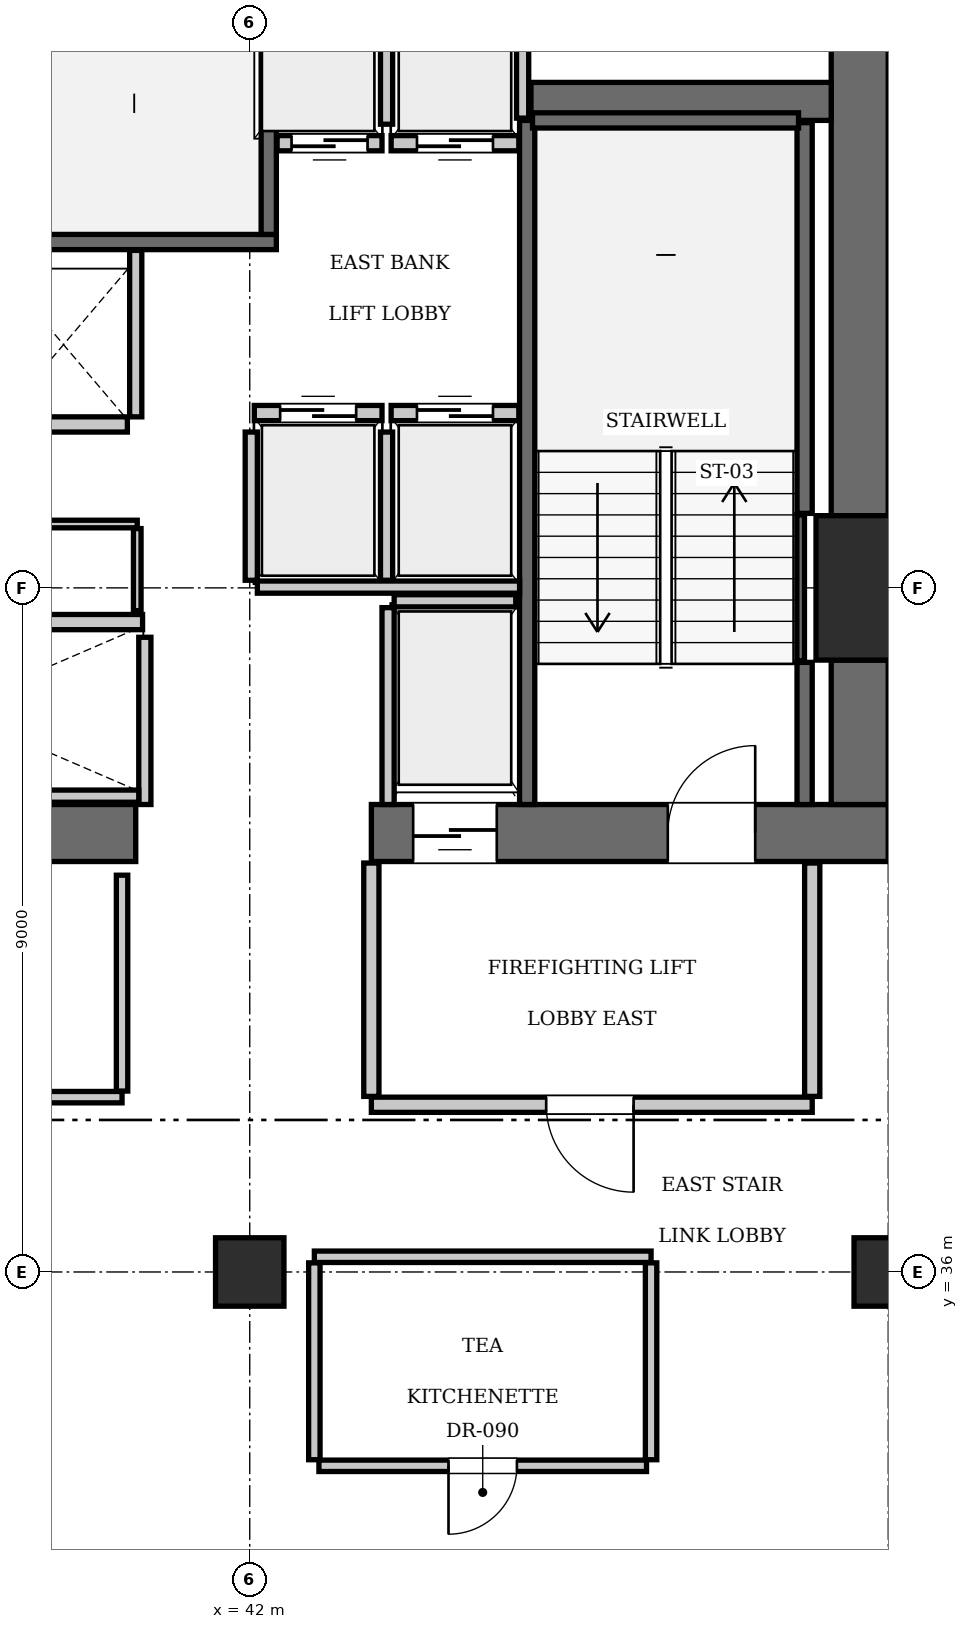
"""IFC4 building model, lengths in metres.
Left out: names, types, materials, properties, quantities, classifications, styles, units other than length and angle.
Written with IfcOpenShell. Run it as: python <this file> out.ifc"""

import sys

from ifc_helpers import new_model, si_unit, direction, frame, frame_2d, origin, origin_2d, place, context, subcontext, project, spatial, rectangle, extrude, element, fill, save


model = new_model("IFC4")
c1 = context("Model", 3, precision=1e-05, world=origin(), true_north=direction((0.0, 1.0)))
c2 = subcontext(c1, "Body", "Model", "MODEL_VIEW")
j1 = project(units=[si_unit("LENGTHUNIT", "METRE"), si_unit("PLANEANGLEUNIT", "RADIAN")], contexts=[c1])
p1 = place(None, origin())
s1 = spatial("IfcSite", under=j1, at=p1, CompositionType="ELEMENT")
p2 = place(p1, origin())
s2 = spatial("IfcBuilding", under=s1, at=p2, CompositionType="ELEMENT")
p3 = place(p2, frame((0.0, 0.0, 150.5)))
s3 = spatial("IfcBuildingStorey", under=s2, at=p3, CompositionType="ELEMENT", Elevation=150.5)
p4 = place(p3, frame((50.4, 45.0, 0.0), z_axis=(0.0, 0.0, 1.0), x_axis=(1.0, 0.0, 0.0)))
e1 = element("IfcColumn", 1, at=p4, inside=s3, PredefinedType="COLUMN", context=c2, shape_type="SweptSolid", body=[
    extrude(rectangle(XDim=1.9, YDim=1.9, at=origin_2d()), origin(), (0.0, 0.0, 1.0), 3.85),
])
p5 = place(p3, frame((35.1, 41.775, 0.0), z_axis=(0.0, 0.0, 1.0), x_axis=(1.0, 0.0, 0.0)))
e2 = element("IfcWall", 2, at=p5, inside=s3, PredefinedType="SHEAR", context=c2, shape_type="SweptSolid", body=[
    extrude(rectangle(XDim=5.4, YDim=0.75, at=frame_2d((2.7, 0.0))), origin(), (0.0, 0.0, 1.0), 3.85),
])
p6 = place(p3, frame((43.6, 41.775, 0.0), z_axis=(0.0, 0.0, 1.0), x_axis=(1.0, 0.0, 0.0)))
e3 = element("IfcWall", 3, at=p6, inside=s3, PredefinedType="SHEAR", context=c2, shape_type="SweptSolid", body=[
    extrude(rectangle(XDim=6.8, YDim=0.75, at=frame_2d((3.4, 0.0))), origin(), (0.0, 0.0, 1.0), 3.85),
])
p7 = place(p6, frame((3.9, 0.0, 0.0)))
e4 = element("IfcOpeningElement", 4, at=p7, cuts=e3, PredefinedType="OPENING", context=c2, shape_type="SweptSolid", body=[
    extrude(rectangle(XDim=1.15, YDim=2.15, at=frame_2d((0.575, 1.075))), frame((0.0, 0.385, 0.0), z_axis=(0.0, -1.0, 0.0), x_axis=(1.0, 0.0, 0.0)), (0.0, 0.0, 1.0), 0.77),
])
p8 = place(p6, frame((0.55, 0.0, 0.0)))
e5 = element("IfcOpeningElement", 5, at=p8, cuts=e3, PredefinedType="OPENING", context=c2, shape_type="SweptSolid", body=[
    extrude(rectangle(XDim=1.1, YDim=2.2, at=frame_2d((0.55, 1.1))), frame((0.0, 0.385, 0.0), z_axis=(0.0, -1.0, 0.0), x_axis=(1.0, 0.0, 0.0)), (0.0, 0.0, 1.0), 0.77),
])
p9 = place(p3, frame((50.025, 42.15, 0.0), z_axis=(0.0, 0.0, 1.0), x_axis=(0.0, 1.0, 0.0)))
e6 = element("IfcWall", 6, at=p9, inside=s3, PredefinedType="SHEAR", context=c2, shape_type="SweptSolid", body=[
    extrude(rectangle(XDim=1.9, YDim=0.75, at=frame_2d((0.95, 0.0))), origin(), (0.0, 0.0, 1.0), 3.85),
])
p10 = place(p3, frame((50.025, 45.95, 0.0), z_axis=(0.0, 0.0, 1.0), x_axis=(0.0, 1.0, 0.0)))
e7 = element("IfcWall", 7, at=p10, inside=s3, PredefinedType="SHEAR", context=c2, shape_type="SweptSolid", body=[
    extrude(rectangle(XDim=7.3, YDim=0.75, at=frame_2d((3.65, 0.0))), origin(), (0.0, 0.0, 1.0), 3.85),
])
p11 = place(p3, frame((45.7, 51.4, 0.0), z_axis=(0.0, 0.0, 1.0), x_axis=(1.0, 0.0, 0.0)))
e8 = element("IfcWall", 8, at=p11, inside=s3, PredefinedType="SHEAR", context=c2, shape_type="SweptSolid", body=[
    extrude(rectangle(XDim=3.95, YDim=0.5, at=frame_2d((1.975, 0.0))), origin(), (0.0, 0.0, 1.0), 3.85),
])
for number, where, z_axis, x_axis in (
    (9, (42.0, 36.0, 0.0), (0.0, 0.0, 1.0), (1.0, 0.0, 0.0)),
    (10, (50.4, 36.0, 0.0), (0.0, 0.0, 1.0), (1.0, 0.0, 0.0)),
):
    element("IfcColumn", number, at=place(p3, frame(where, z_axis=z_axis, x_axis=x_axis)), inside=s3, PredefinedType="COLUMN", context=c2, shape_type="SweptSolid", body=[
        extrude(rectangle(XDim=0.9, YDim=0.9, at=origin_2d()), origin(), (0.0, 0.0, 1.0), 3.85),
    ])
p12 = place(p3, frame((33.25, 49.55, 0.0), z_axis=(0.0, 0.0, 1.0), x_axis=(1.0, 0.0, 0.0)))
e11 = element("IfcWall", 11, at=p12, inside=s3, PredefinedType="SOLIDWALL", context=c2, shape_type="SweptSolid", body=[
    extrude(rectangle(XDim=9.1, YDim=0.2, at=frame_2d((4.55, 0.0))), origin(), (0.0, 0.0, 1.0), 3.61),
])
p13 = place(p3, frame((42.25, 49.65, 0.0), z_axis=(0.0, 0.0, 1.0), x_axis=(0.0, 1.0, 0.0)))
e12 = element("IfcWall", 12, at=p13, inside=s3, PredefinedType="SOLIDWALL", context=c2, shape_type="SweptSolid", body=[
    extrude(rectangle(XDim=3.6, YDim=0.2, at=frame_2d((1.8, 0.0))), origin(), (0.0, 0.0, 1.0), 3.61),
])
p14 = place(p3, frame((45.65, 42.15, 0.0), z_axis=(0.0, 0.0, 1.0), x_axis=(0.0, 1.0, 0.0)))
e13 = element("IfcWall", 13, at=p14, inside=s3, PredefinedType="SOLIDWALL", context=c2, shape_type="SweptSolid", body=[
    extrude(rectangle(XDim=9.0, YDim=0.2, at=frame_2d((4.5, 0.0))), origin(), (0.0, 0.0, 1.0), 3.61),
])
p15 = place(p3, frame((49.3, 42.15, 0.0), z_axis=(0.0, 0.0, 1.0), x_axis=(0.0, 1.0, 0.0)))
e14 = element("IfcWall", 14, at=p15, inside=s3, PredefinedType="SOLIDWALL", context=c2, shape_type="SweptSolid", body=[
    extrude(rectangle(XDim=1.87, YDim=0.2, at=frame_2d((0.935, 0.0))), origin(), (0.0, 0.0, 1.0), 3.61),
])
p16 = place(p3, frame((49.3, 45.98, 0.0), z_axis=(0.0, 0.0, 1.0), x_axis=(0.0, 1.0, 0.0)))
e15 = element("IfcWall", 15, at=p16, inside=s3, PredefinedType="SOLIDWALL", context=c2, shape_type="SweptSolid", body=[
    extrude(rectangle(XDim=5.14, YDim=0.2, at=frame_2d((2.57, 0.0))), origin(), (0.0, 0.0, 1.0), 3.61),
])
p17 = place(p3, frame((45.72, 51.15, 0.0), z_axis=(0.0, 0.0, 1.0), x_axis=(1.0, 0.0, 0.0)))
e16 = element("IfcWall", 16, at=p17, inside=s3, PredefinedType="SOLIDWALL", context=c2, shape_type="SweptSolid", body=[
    extrude(rectangle(XDim=3.5, YDim=0.2, at=frame_2d((1.75, 0.0))), origin(), (0.0, 0.0, 1.0), 3.61),
])
p18 = place(p3, frame((49.248, 44.04, 0.0), z_axis=(0.0, 0.0, 1.0), x_axis=(0.0, 1.0, 0.0)))
e17 = element("IfcWall", 17, at=p18, inside=s3, PredefinedType="SOLIDWALL", context=c2, shape_type="SweptSolid", body=[
    extrude(rectangle(XDim=1.92, YDim=0.1, at=frame_2d((0.96, 0.0))), origin(), (0.0, 0.0, 1.0), 3.61),
])
p19 = place(p3, frame((42.06, 47.3, 0.0), z_axis=(0.0, 0.0, 1.0), x_axis=(1.0, 0.0, 0.0)))
e18 = element("IfcWall", 18, at=p19, inside=s3, PredefinedType="SOLIDWALL", context=c2, shape_type="SweptSolid", body=[
    extrude(rectangle(XDim=1.68, YDim=0.2, at=frame_2d((0.84, 0.0))), origin(), (0.0, 0.0, 1.0), 3.61),
])
p20 = place(p19, frame((0.34, 0.0, 0.0)))
e19 = element("IfcOpeningElement", 19, at=p20, cuts=e18, PredefinedType="OPENING", context=c2, shape_type="SweptSolid", body=[
    extrude(rectangle(XDim=1.0, YDim=2.15, at=frame_2d((0.5, 1.075))), frame((0.0, 0.11, 0.0), z_axis=(0.0, -1.0, 0.0), x_axis=(1.0, 0.0, 0.0)), (0.0, 0.0, 1.0), 0.22),
])
p21 = place(p3, frame((43.86, 47.3, 0.0), z_axis=(0.0, 0.0, 1.0), x_axis=(1.0, 0.0, 0.0)))
e20 = element("IfcWall", 20, at=p21, inside=s3, PredefinedType="SOLIDWALL", context=c2, shape_type="SweptSolid", body=[
    extrude(rectangle(XDim=1.68, YDim=0.2, at=frame_2d((0.84, 0.0))), origin(), (0.0, 0.0, 1.0), 3.61),
])
p22 = place(p21, frame((0.34, 0.0, 0.0)))
e21 = element("IfcOpeningElement", 21, at=p22, cuts=e20, PredefinedType="OPENING", context=c2, shape_type="SweptSolid", body=[
    extrude(rectangle(XDim=1.0, YDim=2.15, at=frame_2d((0.5, 1.075))), frame((0.0, 0.11, 0.0), z_axis=(0.0, -1.0, 0.0), x_axis=(1.0, 0.0, 0.0)), (0.0, 0.0, 1.0), 0.22),
])
p23 = place(p3, frame((42.36, 50.85, 0.0), z_axis=(0.0, 0.0, 1.0), x_axis=(1.0, 0.0, 0.0)))
e22 = element("IfcWall", 22, at=p23, inside=s3, PredefinedType="SOLIDWALL", context=c2, shape_type="SweptSolid", body=[
    extrude(rectangle(XDim=1.38, YDim=0.2, at=frame_2d((0.69, 0.0))), origin(), (0.0, 0.0, 1.0), 3.61),
])
p24 = place(p23, frame((0.19, 0.0, 0.0)))
e23 = element("IfcOpeningElement", 23, at=p24, cuts=e22, PredefinedType="OPENING", context=c2, shape_type="SweptSolid", body=[
    extrude(rectangle(XDim=1.0, YDim=2.15, at=frame_2d((0.5, 1.075))), frame((0.0, 0.11, 0.0), z_axis=(0.0, -1.0, 0.0), x_axis=(1.0, 0.0, 0.0)), (0.0, 0.0, 1.0), 0.22),
])
p25 = place(p3, frame((43.86, 50.85, 0.0), z_axis=(0.0, 0.0, 1.0), x_axis=(1.0, 0.0, 0.0)))
e24 = element("IfcWall", 24, at=p25, inside=s3, PredefinedType="SOLIDWALL", context=c2, shape_type="SweptSolid", body=[
    extrude(rectangle(XDim=1.68, YDim=0.2, at=frame_2d((0.84, 0.0))), origin(), (0.0, 0.0, 1.0), 3.61),
])
p26 = place(p25, frame((0.34, 0.0, 0.0)))
e25 = element("IfcOpeningElement", 25, at=p26, cuts=e24, PredefinedType="OPENING", context=c2, shape_type="SweptSolid", body=[
    extrude(rectangle(XDim=1.0, YDim=2.15, at=frame_2d((0.5, 1.075))), frame((0.0, 0.11, 0.0), z_axis=(0.0, -1.0, 0.0), x_axis=(1.0, 0.0, 0.0)), (0.0, 0.0, 1.0), 0.22),
])
p27 = place(p3, frame((38.91, 44.55, 0.0), z_axis=(0.0, 0.0, 1.0), x_axis=(1.0, 0.0, 0.0)))
e26 = element("IfcWall", 26, at=p27, inside=s3, PredefinedType="SOLIDWALL", context=c2, shape_type="SweptSolid", body=[
    extrude(rectangle(XDim=1.68, YDim=0.2, at=frame_2d((0.84, 0.0))), origin(), (0.0, 0.0, 1.0), 3.61),
])
p28 = place(p3, frame((38.71, 47.15, 0.0), z_axis=(0.0, 0.0, 1.0), x_axis=(1.0, 0.0, 0.0)))
e27 = element("IfcWall", 27, at=p28, inside=s3, PredefinedType="SOLIDWALL", context=c2, shape_type="SweptSolid", body=[
    extrude(rectangle(XDim=1.68, YDim=0.2, at=frame_2d((0.84, 0.0))), origin(), (0.0, 0.0, 1.0), 3.61),
])
p29 = place(p3, frame((43.9, 44.83, 0.0), z_axis=(0.0, 0.0, 1.0), x_axis=(1.0, 0.0, 0.0)))
e28 = element("IfcWall", 28, at=p29, inside=s3, PredefinedType="SOLIDWALL", context=c2, shape_type="SweptSolid", body=[
    extrude(rectangle(XDim=1.6, YDim=0.16, at=frame_2d((0.8, 0.0))), origin(), (0.0, 0.0, 1.0), 3.61),
])
p30 = place(p3, frame((43.82, 42.15, 0.0), z_axis=(0.0, 0.0, 1.0), x_axis=(0.0, 1.0, 0.0)))
e29 = element("IfcWall", 29, at=p30, inside=s3, PredefinedType="SOLIDWALL", context=c2, shape_type="SweptSolid", body=[
    extrude(rectangle(XDim=2.59, YDim=0.16, at=frame_2d((1.295, 0.0))), origin(), (0.0, 0.0, 1.0), 3.61),
])
for number, where, z_axis, x_axis in (
    (30, (42.02, 45.1, 0.0), (0.0, 0.0, 1.0), (0.0, 1.0, 0.0)),
    (31, (43.8, 45.1, 0.0), (0.0, 0.0, 1.0), (0.0, 1.0, 0.0)),
):
    element("IfcWall", number, at=place(p3, frame(where, z_axis=z_axis, x_axis=x_axis)), inside=s3, PredefinedType="SOLIDWALL", context=c2, shape_type="SweptSolid", body=[
        extrude(rectangle(XDim=1.95, YDim=0.16, at=frame_2d((0.975, 0.0))), origin(), (0.0, 0.0, 1.0), 3.61),
    ])
p31 = place(p3, frame((42.1, 45.01, 0.0), z_axis=(0.0, 0.0, 1.0), x_axis=(1.0, 0.0, 0.0)))
e32 = element("IfcWall", 32, at=p31, inside=s3, PredefinedType="SOLIDWALL", context=c2, shape_type="SweptSolid", body=[
    extrude(rectangle(XDim=3.45, YDim=0.16, at=frame_2d((1.725, 0.0))), origin(), (0.0, 0.0, 1.0), 3.61),
])
p32 = place(p3, frame((45.59, 51.18, 0.0), z_axis=(0.0, 0.0, 1.0), x_axis=(0.0, 1.0, 0.0)))
e33 = element("IfcWall", 33, at=p32, inside=s3, PredefinedType="SOLIDWALL", context=c2, shape_type="SweptSolid", body=[
    extrude(rectangle(XDim=2.07, YDim=0.16, at=frame_2d((1.035, 0.0))), origin(), (0.0, 0.0, 1.0), 3.61),
])
p33 = place(p3, frame((43.8, 51.1, 0.0), z_axis=(0.0, 0.0, 1.0), x_axis=(0.0, 1.0, 0.0)))
e34 = element("IfcWall", 34, at=p33, inside=s3, PredefinedType="SOLIDWALL", context=c2, shape_type="SweptSolid", body=[
    extrude(rectangle(XDim=2.15, YDim=0.16, at=frame_2d((1.075, 0.0))), origin(), (0.0, 0.0, 1.0), 3.61),
])
p34 = place(p3, frame((40.62, 42.15, 0.0), z_axis=(0.0, 0.0, 1.0), x_axis=(0.0, 1.0, 0.0)))
e35 = element("IfcWall", 35, at=p34, inside=s3, PredefinedType="SOLIDWALL", context=c2, shape_type="SweptSolid", body=[
    extrude(rectangle(XDim=2.2, YDim=0.16, at=frame_2d((1.1, 0.0))), origin(), (0.0, 0.0, 1.0), 3.61),
])
p35 = place(p3, frame((35.52, 42.26, 0.0), z_axis=(0.0, 0.0, 1.0), x_axis=(1.0, 0.0, 0.0)))
e36 = element("IfcWall", 36, at=p35, inside=s3, PredefinedType="SOLIDWALL", context=c2, shape_type="SweptSolid", body=[
    extrude(rectangle(XDim=5.02, YDim=0.16, at=frame_2d((2.51, 0.0))), origin(), (0.0, 0.0, 1.0), 3.61),
])
p36 = place(p3, frame((40.5, 47.25, 0.0), z_axis=(0.0, 0.0, 1.0), x_axis=(0.0, 1.0, 0.0)))
e37 = element("IfcWall", 37, at=p36, inside=s3, PredefinedType="SOLIDWALL", context=c2, shape_type="SweptSolid", body=[
    extrude(rectangle(XDim=2.19, YDim=0.16, at=frame_2d((1.095, 0.0))), origin(), (0.0, 0.0, 1.0), 3.61),
])
p37 = place(p3, frame((43.6, 38.2, 0.0), z_axis=(0.0, 0.0, 1.0), x_axis=(1.0, 0.0, 0.0)))
e38 = element("IfcWall", 38, at=p37, inside=s3, PredefinedType="PARTITIONING", context=c2, shape_type="SweptSolid", body=[
    extrude(rectangle(XDim=5.8, YDim=0.2, at=frame_2d((2.9, 0.0))), origin(), (0.0, 0.0, 1.0), 3.61),
])
p38 = place(p37, frame((2.3, 0.0, 0.0)))
e39 = element("IfcOpeningElement", 39, at=p38, cuts=e38, PredefinedType="OPENING", context=c2, shape_type="SweptSolid", body=[
    extrude(rectangle(XDim=1.15, YDim=2.15, at=frame_2d((0.575, 1.075))), frame((0.0, 0.11, 0.0), z_axis=(0.0, -1.0, 0.0), x_axis=(1.0, 0.0, 0.0)), (0.0, 0.0, 1.0), 0.22),
])
for number, where, z_axis, x_axis in (
    (40, (43.6, 38.31, 0.0), (0.0, 0.0, 1.0), (0.0, 1.0, 0.0)),
    (41, (49.4, 38.31, 0.0), (0.0, 0.0, 1.0), (0.0, 1.0, 0.0)),
):
    element("IfcWall", number, at=place(p3, frame(where, z_axis=z_axis, x_axis=x_axis)), inside=s3, PredefinedType="PARTITIONING", context=c2, shape_type="SweptSolid", body=[
        extrude(rectangle(XDim=3.07, YDim=0.2, at=frame_2d((1.535, 0.0))), origin(), (0.0, 0.0, 1.0), 3.61),
    ])
p39 = place(p3, frame((35.58, 45.84, 0.0), z_axis=(0.0, 0.0, 1.0), x_axis=(1.0, 0.0, 0.0)))
e42 = element("IfcWall", 42, at=p39, inside=s3, PredefinedType="PARTITIONING", context=c2, shape_type="SweptSolid", body=[
    extrude(rectangle(XDim=4.94, YDim=0.1, at=frame_2d((2.47, 0.0))), origin(), (0.0, 0.0, 1.0), 3.61),
])
p40 = place(p39, frame((1.8, 0.0, 0.0)))
e43 = element("IfcOpeningElement", 43, at=p40, cuts=e42, PredefinedType="OPENING", context=c2, shape_type="SweptSolid", body=[
    extrude(rectangle(XDim=0.8, YDim=2.05, at=frame_2d((0.4, 1.025))), frame((0.0, 0.06, 0.0), z_axis=(0.0, -1.0, 0.0), x_axis=(1.0, 0.0, 0.0)), (0.0, 0.0, 1.0), 0.12),
])
p41 = place(p3, frame((40.52, 44.7, 0.0), z_axis=(0.0, 0.0, 1.0), x_axis=(0.0, 1.0, 0.0)))
e44 = element("IfcWall", 44, at=p41, inside=s3, PredefinedType="PARTITIONING", context=c2, shape_type="SweptSolid", body=[
    extrude(rectangle(XDim=1.08, YDim=0.1, at=frame_2d((0.54, 0.0))), origin(), (0.0, 0.0, 1.0), 3.61),
])
p42 = place(p3, frame((34.4, 38.3, 0.0), z_axis=(0.0, 0.0, 1.0), x_axis=(1.0, 0.0, 0.0)))
e45 = element("IfcWall", 45, at=p42, inside=s3, PredefinedType="PARTITIONING", context=c2, shape_type="SweptSolid", body=[
    extrude(rectangle(XDim=5.92, YDim=0.15, at=frame_2d((2.96, 0.0))), origin(), (0.0, 0.0, 1.0), 3.61),
])
p43 = place(p42, frame((2.4, 0.0, 0.0)))
e46 = element("IfcOpeningElement", 46, at=p43, cuts=e45, PredefinedType="OPENING", context=c2, shape_type="SweptSolid", body=[
    extrude(rectangle(XDim=0.9, YDim=2.1, at=frame_2d((0.45, 1.05))), frame((0.0, 0.085, 0.0), z_axis=(0.0, -1.0, 0.0), x_axis=(1.0, 0.0, 0.0)), (0.0, 0.0, 1.0), 0.17),
])
p44 = place(p3, frame((40.32, 38.38, 0.0), z_axis=(0.0, 0.0, 1.0), x_axis=(0.0, 1.0, 0.0)))
e47 = element("IfcWall", 47, at=p44, inside=s3, PredefinedType="PARTITIONING", context=c2, shape_type="SweptSolid", body=[
    extrude(rectangle(XDim=2.84, YDim=0.15, at=frame_2d((1.42, 0.0))), origin(), (0.0, 0.0, 1.0), 3.61),
])
p45 = place(p3, frame((42.85, 36.2, 0.0), z_axis=(0.0, 0.0, 1.0), x_axis=(1.0, 0.0, 0.0)))
e48 = element("IfcWall", 48, at=p45, inside=s3, PredefinedType="PARTITIONING", context=c2, shape_type="SweptSolid", body=[
    extrude(rectangle(XDim=4.43, YDim=0.15, at=frame_2d((2.215, 0.0))), origin(), (0.0, 0.0, 1.0), 3.61),
])
for number, where, z_axis, x_axis in (
    (49, (42.85, 33.53, 0.0), (0.0, 0.0, 1.0), (0.0, 1.0, 0.0)),
    (50, (47.28, 33.53, 0.0), (0.0, 0.0, 1.0), (0.0, 1.0, 0.0)),
):
    element("IfcWall", number, at=place(p3, frame(where, z_axis=z_axis, x_axis=x_axis)), inside=s3, PredefinedType="PARTITIONING", context=c2, shape_type="SweptSolid", body=[
        extrude(rectangle(XDim=2.59, YDim=0.15, at=frame_2d((1.295, 0.0))), origin(), (0.0, 0.0, 1.0), 3.61),
    ])
p46 = place(p3, frame((42.91, 33.45, 0.0), z_axis=(0.0, 0.0, 1.0), x_axis=(1.0, 0.0, 0.0)))
e51 = element("IfcWall", 51, at=p46, inside=s3, PredefinedType="PARTITIONING", context=c2, shape_type="SweptSolid", body=[
    extrude(rectangle(XDim=4.31, YDim=0.15, at=frame_2d((2.155, 0.0))), origin(), (0.0, 0.0, 1.0), 3.61),
])
p47 = place(p46, frame((1.705, 0.0, 0.0)))
e52 = element("IfcOpeningElement", 52, at=p47, cuts=e51, PredefinedType="OPENING", context=c2, shape_type="SweptSolid", body=[
    extrude(rectangle(XDim=0.9, YDim=2.1, at=frame_2d((0.45, 1.05))), frame((0.0, 0.085, 0.0), z_axis=(0.0, -1.0, 0.0), x_axis=(1.0, 0.0, 0.0)), (0.0, 0.0, 1.0), 0.17),
])
p48 = place(p7, origin())
e53 = element("IfcDoor", 53, at=p48, inside=s3, OperationType="SINGLE_SWING_RIGHT", PredefinedType="DOOR", context=c2, shape_type="SweptSolid", body=[
    extrude(rectangle(XDim=1.15, YDim=2.15, at=frame_2d((0.575, 1.075))), frame((0.0, 0.025, 0.0), z_axis=(0.0, -1.0, 0.0), x_axis=(1.0, 0.0, 0.0)), (0.0, 0.0, 1.0), 0.05),
])
fill(e4, e53)
p49 = place(p20, origin())
e54 = element("IfcDoor", 54, at=p49, inside=s3, OperationType="SLIDING_TO_LEFT", PredefinedType="DOOR", context=c2, shape_type="SweptSolid", body=[
    extrude(rectangle(XDim=1.0, YDim=2.15, at=frame_2d((0.5, 1.075))), frame((0.0, 0.025, 0.0), z_axis=(0.0, -1.0, 0.0), x_axis=(1.0, 0.0, 0.0)), (0.0, 0.0, 1.0), 0.05),
])
fill(e19, e54)
p50 = place(p22, origin())
e55 = element("IfcDoor", 55, at=p50, inside=s3, OperationType="SLIDING_TO_LEFT", PredefinedType="DOOR", context=c2, shape_type="SweptSolid", body=[
    extrude(rectangle(XDim=1.0, YDim=2.15, at=frame_2d((0.5, 1.075))), frame((0.0, 0.025, 0.0), z_axis=(0.0, -1.0, 0.0), x_axis=(1.0, 0.0, 0.0)), (0.0, 0.0, 1.0), 0.05),
])
fill(e21, e55)
p51 = place(p24, frame((1.0, 0.0, 0.0), z_axis=(0.0, 0.0, 1.0), x_axis=(-1.0, 0.0, 0.0)))
e56 = element("IfcDoor", 56, at=p51, inside=s3, OperationType="SLIDING_TO_LEFT", PredefinedType="DOOR", context=c2, shape_type="SweptSolid", body=[
    extrude(rectangle(XDim=1.0, YDim=2.15, at=frame_2d((0.5, 1.075))), frame((0.0, 0.025, 0.0), z_axis=(0.0, -1.0, 0.0), x_axis=(1.0, 0.0, 0.0)), (0.0, 0.0, 1.0), 0.05),
])
fill(e23, e56)
p52 = place(p26, frame((1.0, 0.0, 0.0), z_axis=(0.0, 0.0, 1.0), x_axis=(-1.0, 0.0, 0.0)))
e57 = element("IfcDoor", 57, at=p52, inside=s3, OperationType="SLIDING_TO_LEFT", PredefinedType="DOOR", context=c2, shape_type="SweptSolid", body=[
    extrude(rectangle(XDim=1.0, YDim=2.15, at=frame_2d((0.5, 1.075))), frame((0.0, 0.025, 0.0), z_axis=(0.0, -1.0, 0.0), x_axis=(1.0, 0.0, 0.0)), (0.0, 0.0, 1.0), 0.05),
])
fill(e25, e57)
p53 = place(p8, frame((1.1, 0.0, 0.0), z_axis=(0.0, 0.0, 1.0), x_axis=(-1.0, 0.0, 0.0)))
e58 = element("IfcDoor", 58, at=p53, inside=s3, OperationType="SLIDING_TO_LEFT", PredefinedType="DOOR", context=c2, shape_type="SweptSolid", body=[
    extrude(rectangle(XDim=1.1, YDim=2.2, at=frame_2d((0.55, 1.1))), frame((0.0, 0.025, 0.0), z_axis=(0.0, -1.0, 0.0), x_axis=(1.0, 0.0, 0.0)), (0.0, 0.0, 1.0), 0.05),
])
fill(e5, e58)
p54 = place(p38, frame((1.15, 0.0, 0.0), z_axis=(0.0, 0.0, 1.0), x_axis=(-1.0, 0.0, 0.0)))
e59 = element("IfcDoor", 59, at=p54, inside=s3, OperationType="SINGLE_SWING_LEFT", PredefinedType="DOOR", context=c2, shape_type="SweptSolid", body=[
    extrude(rectangle(XDim=1.15, YDim=2.15, at=frame_2d((0.575, 1.075))), frame((0.0, 0.025, 0.0), z_axis=(0.0, -1.0, 0.0), x_axis=(1.0, 0.0, 0.0)), (0.0, 0.0, 1.0), 0.05),
])
fill(e39, e59)
p55 = place(p47, frame((0.9, 0.0, 0.0), z_axis=(0.0, 0.0, 1.0), x_axis=(-1.0, 0.0, 0.0)))
e60 = element("IfcDoor", 60, at=p55, inside=s3, OperationType="SINGLE_SWING_RIGHT", PredefinedType="DOOR", context=c2, shape_type="SweptSolid", body=[
    extrude(rectangle(XDim=0.9, YDim=2.1, at=frame_2d((0.45, 1.05))), frame((0.0, 0.025, 0.0), z_axis=(0.0, -1.0, 0.0), x_axis=(1.0, 0.0, 0.0)), (0.0, 0.0, 1.0), 0.05),
])
fill(e52, e60)
save(model, sys.argv[1])
